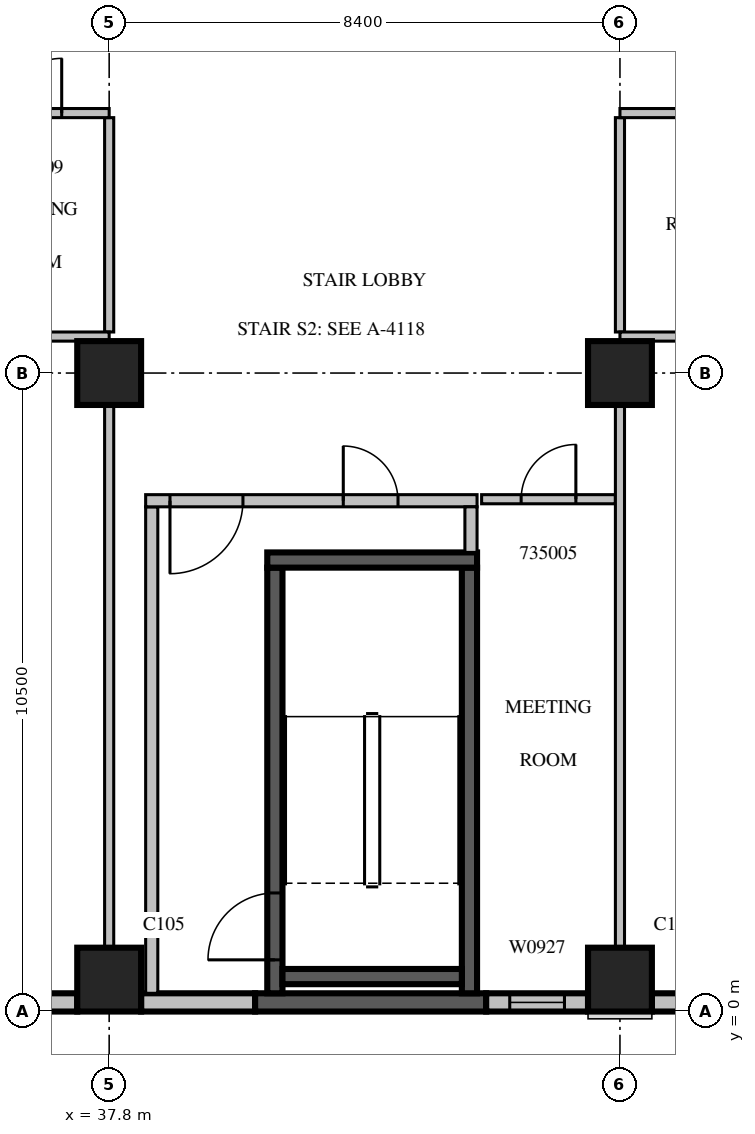
"""IFC4 building model, lengths in metres.
Left out: names, types, materials, properties, quantities, classifications, styles, units other than length and angle.
Written with IfcOpenShell. Run it as: python <this file> out.ifc"""

import sys

from ifc_helpers import new_model, si_unit, direction, frame, frame_2d, origin, origin_2d, place, context, subcontext, project, spatial, rectangle, extrude, source, transform, mapped, element, fill, save


model = new_model("IFC4")
c1 = context("Model", 3, precision=1e-05, world=origin(), true_north=direction((0.0, 1.0)))
c2 = subcontext(c1, "Body", "Model", "MODEL_VIEW")
j1 = project(units=[si_unit("LENGTHUNIT", "METRE"), si_unit("PLANEANGLEUNIT", "RADIAN")], contexts=[c1])
p1 = place(None, origin())
s1 = spatial("IfcSite", under=j1, at=p1, CompositionType="ELEMENT")
p2 = place(p1, origin())
s2 = spatial("IfcBuilding", under=s1, at=p2, CompositionType="ELEMENT")
p3 = place(p2, frame((0.0, 0.0, 158.1)))
s3 = spatial("IfcBuildingStorey", under=s2, at=p3, CompositionType="ELEMENT", Elevation=158.1)
m1 = source(origin(), c2, "Body", "SweptSolid", [
    extrude(rectangle(XDim=1.05, YDim=1.05, at=origin_2d()), origin(), (0.0, 0.0, 1.0), 4.2),
])
for number, where, z_axis, x_axis in (
    (1, (37.8, 0.525, 0.0), (0.0, 0.0, 1.0), (1.0, 0.0, 0.0)),
    (2, (46.2, 0.525, 0.0), (0.0, 0.0, 1.0), (1.0, 0.0, 0.0)),
    (3, (37.8, 10.5, 0.0), (0.0, 0.0, 1.0), (1.0, 0.0, 0.0)),
    (4, (46.2, 10.5, 0.0), (0.0, 0.0, 1.0), (1.0, 0.0, 0.0)),
):
    element("IfcColumn", number, at=place(p3, frame(where, z_axis=z_axis, x_axis=x_axis)), inside=s3, PredefinedType="COLUMN", context=c2, shape_type="MappedRepresentation", body=[
        mapped(m1, transform((0.0, 0.0, 0.0), scale=1.0)),
    ])
m2 = source(origin(), c2, "Body", "SweptSolid", [
    extrude(rectangle(XDim=7.35, YDim=0.3, at=frame_2d((3.675, 0.0))), origin(), (0.0, 0.0, 1.0), 3.8),
])
p4 = place(p3, frame((29.925, 0.15, 0.0), z_axis=(0.0, 0.0, 1.0), x_axis=(1.0, 0.0, 0.0)))
e5 = element("IfcWall", 5, at=p4, inside=s3, PredefinedType="STANDARD", context=c2, shape_type="MappedRepresentation", body=[
    mapped(m2, transform((0.0, 0.0, 0.0), scale=1.0)),
])
m3 = source(origin(), c2, "Body", "SweptSolid", [
    extrude(rectangle(XDim=2.4, YDim=2.7, at=frame_2d((1.2, 1.35))), frame((0.0, 0.16, 0.0), z_axis=(0.0, -1.0, 0.0), x_axis=(1.0, 0.0, 0.0)), (0.0, 0.0, 1.0), 0.32),
])
p5 = place(p4, frame((2.575, 0.0, 0.6)))
e6 = element("IfcOpeningElement", 6, at=p5, cuts=e5, PredefinedType="OPENING", context=c2, shape_type="MappedRepresentation", body=[
    mapped(m3, transform((0.0, 0.0, 0.0), scale=1.0)),
])
m4 = source(origin(), c2, "Body", "SweptSolid", [
    extrude(rectangle(XDim=1.875, YDim=0.3, at=frame_2d((0.938, 0.0))), origin(), (0.0, 0.0, 1.0), 3.8),
])
p6 = place(p3, frame((38.325, 0.15, 0.0), z_axis=(0.0, 0.0, 1.0), x_axis=(1.0, 0.0, 0.0)))
e7 = element("IfcWall", 7, at=p6, inside=s3, PredefinedType="STANDARD", context=c2, shape_type="MappedRepresentation", body=[
    mapped(m4, transform((0.0, 0.0, 0.0), scale=1.0)),
])
m5 = source(origin(), c2, "Body", "SweptSolid", [
    extrude(rectangle(XDim=3.8, YDim=0.3, at=frame_2d((1.9, 0.0))), origin(), (0.0, 0.0, 1.0), 3.8),
])
p7 = place(p3, frame((40.2, 0.15, 0.0), z_axis=(0.0, 0.0, 1.0), x_axis=(1.0, 0.0, 0.0)))
e8 = element("IfcWall", 8, at=p7, inside=s3, PredefinedType="SOLIDWALL", context=c2, shape_type="MappedRepresentation", body=[
    mapped(m5, transform((0.0, 0.0, 0.0), scale=1.0)),
])
m6 = source(origin(), c2, "Body", "SweptSolid", [
    extrude(rectangle(XDim=1.675, YDim=0.3, at=frame_2d((0.838, 0.0))), origin(), (0.0, 0.0, 1.0), 3.8),
])
p8 = place(p3, frame((44.0, 0.15, 0.0), z_axis=(0.0, 0.0, 1.0), x_axis=(1.0, 0.0, 0.0)))
e9 = element("IfcWall", 9, at=p8, inside=s3, PredefinedType="STANDARD", context=c2, shape_type="MappedRepresentation", body=[
    mapped(m6, transform((0.0, 0.0, 0.0), scale=1.0)),
])
m7 = source(origin(), c2, "Body", "SweptSolid", [
    extrude(rectangle(XDim=0.9, YDim=2.7, at=frame_2d((0.45, 1.35))), frame((0.0, 0.16, 0.0), z_axis=(0.0, -1.0, 0.0), x_axis=(1.0, 0.0, 0.0)), (0.0, 0.0, 1.0), 0.32),
])
p9 = place(p8, frame((0.388, 0.0, 0.6)))
e10 = element("IfcOpeningElement", 10, at=p9, cuts=e9, PredefinedType="OPENING", context=c2, shape_type="MappedRepresentation", body=[
    mapped(m7, transform((0.0, 0.0, 0.0), scale=1.0)),
])
m8 = source(origin(), c2, "Body", "SweptSolid", [
    extrude(rectangle(XDim=4.83, YDim=0.3, at=frame_2d((2.415, 0.0))), origin(), (0.0, 0.0, 1.0), 3.8),
])
p10 = place(p3, frame((46.725, 0.15, 0.0), z_axis=(0.0, 0.0, 1.0), x_axis=(1.0, 0.0, 0.0)))
e11 = element("IfcWall", 11, at=p10, inside=s3, PredefinedType="STANDARD", context=c2, shape_type="MappedRepresentation", body=[
    mapped(m8, transform((0.0, 0.0, 0.0), scale=1.0)),
])
m9 = source(origin(), c2, "Body", "SweptSolid", [
    extrude(rectangle(XDim=3.6, YDim=2.7, at=frame_2d((1.8, 1.35))), frame((0.0, 0.16, 0.0), z_axis=(0.0, -1.0, 0.0), x_axis=(1.0, 0.0, 0.0)), (0.0, 0.0, 1.0), 0.32),
])
p11 = place(p10, frame((0.615, 0.0, 0.6)))
e12 = element("IfcOpeningElement", 12, at=p11, cuts=e11, PredefinedType="OPENING", context=c2, shape_type="MappedRepresentation", body=[
    mapped(m9, transform((0.0, 0.0, 0.0), scale=1.0)),
])
m10 = source(origin(), c2, "Body", "SweptSolid", [
    extrude(rectangle(XDim=7.0, YDim=0.25, at=frame_2d((3.5, 0.0))), origin(), (0.0, 0.0, 1.0), 3.8),
])
p12 = place(p3, frame((40.525, 0.3, 0.0), z_axis=(0.0, 0.0, 1.0), x_axis=(0.0, 1.0, 0.0)))
e13 = element("IfcWall", 13, at=p12, inside=s3, PredefinedType="SOLIDWALL", context=c2, shape_type="MappedRepresentation", body=[
    mapped(m10, transform((0.0, 0.0, 0.0), scale=1.0)),
])
m11 = source(origin(), c2, "Body", "SweptSolid", [
    extrude(rectangle(XDim=1.1, YDim=2.1, at=frame_2d((0.55, 1.05))), frame((0.0, 0.135, 0.0), z_axis=(0.0, -1.0, 0.0), x_axis=(1.0, 0.0, 0.0)), (0.0, 0.0, 1.0), 0.27),
])
p13 = place(p12, frame((0.55, 0.0, 0.0)))
e14 = element("IfcOpeningElement", 14, at=p13, cuts=e13, PredefinedType="OPENING", context=c2, shape_type="MappedRepresentation", body=[
    mapped(m11, transform((0.0, 0.0, 0.0), scale=1.0)),
])
p14 = place(p3, frame((43.725, 0.3, 0.0), z_axis=(0.0, 0.0, 1.0), x_axis=(0.0, 1.0, 0.0)))
e15 = element("IfcWall", 15, at=p14, inside=s3, PredefinedType="SOLIDWALL", context=c2, shape_type="MappedRepresentation", body=[
    mapped(m10, transform((0.0, 0.0, 0.0), scale=1.0)),
])
m12 = source(origin(), c2, "Body", "SweptSolid", [
    extrude(rectangle(XDim=3.45, YDim=0.25, at=frame_2d((1.725, 0.0))), origin(), (0.0, 0.0, 1.0), 3.8),
])
p15 = place(p3, frame((40.4, 7.425, 0.0), z_axis=(0.0, 0.0, 1.0), x_axis=(1.0, 0.0, 0.0)))
e16 = element("IfcWall", 16, at=p15, inside=s3, PredefinedType="SOLIDWALL", context=c2, shape_type="MappedRepresentation", body=[
    mapped(m12, transform((0.0, 0.0, 0.0), scale=1.0)),
])
m13 = source(origin(), c2, "Body", "SweptSolid", [
    extrude(rectangle(XDim=2.95, YDim=0.25, at=frame_2d((1.475, 0.0))), origin(), (0.0, 0.0, 1.0), 3.8),
])
p16 = place(p3, frame((40.65, 0.575, 0.0), z_axis=(0.0, 0.0, 1.0), x_axis=(1.0, 0.0, 0.0)))
e17 = element("IfcWall", 17, at=p16, inside=s3, PredefinedType="SOLIDWALL", context=c2, shape_type="MappedRepresentation", body=[
    mapped(m13, transform((0.0, 0.0, 0.0), scale=1.0)),
])
m14 = source(origin(), c2, "Body", "SweptSolid", [
    extrude(rectangle(XDim=8.0, YDim=0.2, at=frame_2d((4.0, 0.0))), origin(), (0.0, 0.0, 1.0), 3.8),
])
p17 = place(p3, frame((38.5, 0.3, 0.0), z_axis=(0.0, 0.0, 1.0), x_axis=(0.0, 1.0, 0.0)))
e18 = element("IfcWall", 18, at=p17, inside=s3, PredefinedType="PARTITIONING", context=c2, shape_type="MappedRepresentation", body=[
    mapped(m14, transform((0.0, 0.0, 0.0), scale=1.0)),
])
m15 = source(origin(), c2, "Body", "SweptSolid", [
    extrude(rectangle(XDim=5.45, YDim=0.2, at=frame_2d((2.725, 0.0))), origin(), (0.0, 0.0, 1.0), 3.8),
])
p18 = place(p3, frame((38.4, 8.4, 0.0), z_axis=(0.0, 0.0, 1.0), x_axis=(1.0, 0.0, 0.0)))
e19 = element("IfcWall", 19, at=p18, inside=s3, PredefinedType="PARTITIONING", context=c2, shape_type="MappedRepresentation", body=[
    mapped(m15, transform((0.0, 0.0, 0.0), scale=1.0)),
])
m16 = source(origin(), c2, "Body", "SweptSolid", [
    extrude(rectangle(XDim=1.2, YDim=2.1, at=frame_2d((0.6, 1.05))), frame((0.0, 0.11, 0.0), z_axis=(0.0, -1.0, 0.0), x_axis=(1.0, 0.0, 0.0)), (0.0, 0.0, 1.0), 0.22),
])
p19 = place(p18, frame((0.4, 0.0, 0.0)))
e20 = element("IfcOpeningElement", 20, at=p19, cuts=e19, PredefinedType="OPENING", context=c2, shape_type="MappedRepresentation", body=[
    mapped(m16, transform((0.0, 0.0, 0.0), scale=1.0)),
])
m17 = source(origin(), c2, "Body", "SweptSolid", [
    extrude(rectangle(XDim=0.9, YDim=2.1, at=frame_2d((0.45, 1.05))), frame((0.0, 0.11, 0.0), z_axis=(0.0, -1.0, 0.0), x_axis=(1.0, 0.0, 0.0)), (0.0, 0.0, 1.0), 0.22),
])
p20 = place(p18, frame((3.25, 0.0, 0.0)))
e21 = element("IfcOpeningElement", 21, at=p20, cuts=e19, PredefinedType="OPENING", context=c2, shape_type="MappedRepresentation", body=[
    mapped(m17, transform((0.0, 0.0, 0.0), scale=1.0)),
])
m18 = source(origin(), c2, "Body", "SweptSolid", [
    extrude(rectangle(XDim=0.75, YDim=0.2, at=frame_2d((0.375, 0.0))), origin(), (0.0, 0.0, 1.0), 3.8),
])
p21 = place(p3, frame((43.75, 7.55, 0.0), z_axis=(0.0, 0.0, 1.0), x_axis=(0.0, 1.0, 0.0)))
e22 = element("IfcWall", 22, at=p21, inside=s3, PredefinedType="PARTITIONING", context=c2, shape_type="MappedRepresentation", body=[
    mapped(m18, transform((0.0, 0.0, 0.0), scale=1.0)),
])
m19 = source(origin(), c2, "Body", "SweptSolid", [
    extrude(rectangle(XDim=2.2, YDim=0.15, at=frame_2d((1.1, 0.0))), origin(), (0.0, 0.0, 1.0), 3.8),
])
p22 = place(p3, frame((46.125, 8.425, 0.0), z_axis=(0.0, 0.0, 1.0), x_axis=(-1.0, 0.0, 0.0)))
e23 = element("IfcWall", 23, at=p22, inside=s3, PredefinedType="PARTITIONING", context=c2, shape_type="MappedRepresentation", body=[
    mapped(m19, transform((0.0, 0.0, 0.0), scale=1.0)),
])
m20 = source(origin(), c2, "Body", "SweptSolid", [
    extrude(rectangle(XDim=0.9, YDim=2.1, at=frame_2d((0.45, 1.05))), frame((0.0, 0.085, 0.0), z_axis=(0.0, -1.0, 0.0), x_axis=(1.0, 0.0, 0.0)), (0.0, 0.0, 1.0), 0.17),
])
p23 = place(p22, frame((0.65, 0.0, 0.0)))
e24 = element("IfcOpeningElement", 24, at=p23, cuts=e23, PredefinedType="OPENING", context=c2, shape_type="MappedRepresentation", body=[
    mapped(m20, transform((0.0, 0.0, 0.0), scale=1.0)),
])
m21 = source(origin(), c2, "Body", "SweptSolid", [
    extrude(rectangle(XDim=8.927, YDim=0.15, at=frame_2d((4.463, 0.0))), origin(), (0.0, 0.0, 1.0), 3.8),
])
p24 = place(p3, frame((37.8, 1.049, 0.0), z_axis=(0.0, 0.0, 1.0), x_axis=(0.0, 1.0, 0.0)))
e25 = element("IfcWall", 25, at=p24, inside=s3, PredefinedType="PARTITIONING", context=c2, shape_type="MappedRepresentation", body=[
    mapped(m21, transform((0.0, 0.0, 0.0), scale=1.0)),
])
m22 = source(origin(), c2, "Body", "SweptSolid", [
    extrude(rectangle(XDim=3.525, YDim=0.15, at=frame_2d((1.762, 0.0))), origin(), (0.0, 0.0, 1.0), 3.8),
])
p25 = place(p3, frame((37.8, 11.175, 0.0), z_axis=(0.0, 0.0, 1.0), x_axis=(0.0, 1.0, 0.0)))
e26 = element("IfcWall", 26, at=p25, inside=s3, PredefinedType="PARTITIONING", context=c2, shape_type="MappedRepresentation", body=[
    mapped(m22, transform((0.0, 0.0, 0.0), scale=1.0)),
])
m23 = source(origin(), c2, "Body", "SweptSolid", [
    extrude(rectangle(XDim=8.4, YDim=0.15, at=frame_2d((4.2, 0.0))), origin(), (0.0, 0.0, 1.0), 3.8),
])
p26 = place(p3, frame((37.8, 11.1, 0.0), z_axis=(0.0, 0.0, 1.0), x_axis=(-1.0, 0.0, 0.0)))
e27 = element("IfcWall", 27, at=p26, inside=s3, PredefinedType="PARTITIONING", context=c2, shape_type="MappedRepresentation", body=[
    mapped(m23, transform((0.0, 0.0, 0.0), scale=1.0)),
])
m24 = source(origin(), c2, "Body", "SweptSolid", [
    extrude(rectangle(XDim=1.1, YDim=2.1, at=frame_2d((0.55, 1.05))), frame((0.0, 0.085, 0.0), z_axis=(0.0, -1.0, 0.0), x_axis=(1.0, 0.0, 0.0)), (0.0, 0.0, 1.0), 0.17),
])
p27 = place(p26, frame((5.871, 0.0, 0.0)))
e28 = element("IfcOpeningElement", 28, at=p27, cuts=e27, PredefinedType="OPENING", context=c2, shape_type="MappedRepresentation", body=[
    mapped(m24, transform((0.0, 0.0, 0.0), scale=1.0)),
])
p28 = place(p3, frame((46.2, 1.049, 0.0), z_axis=(0.0, 0.0, 1.0), x_axis=(0.0, 1.0, 0.0)))
e29 = element("IfcWall", 29, at=p28, inside=s3, PredefinedType="PARTITIONING", context=c2, shape_type="MappedRepresentation", body=[
    mapped(m21, transform((0.0, 0.0, 0.0), scale=1.0)),
])
p29 = place(p3, frame((46.2, 11.175, 0.0), z_axis=(0.0, 0.0, 1.0), x_axis=(0.0, 1.0, 0.0)))
e30 = element("IfcWall", 30, at=p29, inside=s3, PredefinedType="PARTITIONING", context=c2, shape_type="MappedRepresentation", body=[
    mapped(m22, transform((0.0, 0.0, 0.0), scale=1.0)),
])
m25 = source(origin(), c2, "Body", "SweptSolid", [
    extrude(rectangle(XDim=24.9, YDim=0.15, at=frame_2d((12.45, 0.0))), origin(), (0.0, 0.0, 1.0), 3.8),
])
p30 = place(p3, frame((71.1, 11.1, 0.0), z_axis=(0.0, 0.0, 1.0), x_axis=(-1.0, 0.0, 0.0)))
e31 = element("IfcWall", 31, at=p30, inside=s3, PredefinedType="PARTITIONING", context=c2, shape_type="MappedRepresentation", body=[
    mapped(m25, transform((0.0, 0.0, 0.0), scale=1.0)),
])
p31 = place(p30, frame((22.451, 0.0, 0.0)))
e32 = element("IfcOpeningElement", 32, at=p31, cuts=e31, PredefinedType="OPENING", context=c2, shape_type="MappedRepresentation", body=[
    mapped(m24, transform((0.0, 0.0, 0.0), scale=1.0)),
])
p32 = place(p30, frame((2.041, 0.0, 0.0)))
e33 = element("IfcOpeningElement", 33, at=p32, cuts=e31, PredefinedType="OPENING", context=c2, shape_type="MappedRepresentation", body=[
    mapped(m24, transform((0.0, 0.0, 0.0), scale=1.0)),
])
p33 = place(p3, frame((37.8, 14.775, 0.0), z_axis=(0.0, 0.0, 1.0), x_axis=(-1.0, 0.0, 0.0)))
e34 = element("IfcWall", 34, at=p33, inside=s3, PredefinedType="PARTITIONING", context=c2, shape_type="MappedRepresentation", body=[
    mapped(m23, transform((0.0, 0.0, 0.0), scale=1.0)),
])
p34 = place(p33, frame((6.146, 0.0, 0.0)))
e35 = element("IfcOpeningElement", 35, at=p34, cuts=e34, PredefinedType="OPENING", context=c2, shape_type="MappedRepresentation", body=[
    mapped(m24, transform((0.0, 0.0, 0.0), scale=1.0)),
])
p35 = place(p33, frame((3.276, 0.0, 0.0)))
e36 = element("IfcOpeningElement", 36, at=p35, cuts=e34, PredefinedType="OPENING", context=c2, shape_type="MappedRepresentation", body=[
    mapped(m20, transform((0.0, 0.0, 0.0), scale=1.0)),
])
p36 = place(p33, frame((0.781, 0.0, 0.0)))
e37 = element("IfcOpeningElement", 37, at=p36, cuts=e34, PredefinedType="OPENING", context=c2, shape_type="MappedRepresentation", body=[
    mapped(m20, transform((0.0, 0.0, 0.0), scale=1.0)),
])
p37 = place(p3, frame((71.1, 14.775, 0.0), z_axis=(0.0, 0.0, 1.0), x_axis=(-1.0, 0.0, 0.0)))
e38 = element("IfcWall", 38, at=p37, inside=s3, PredefinedType="PARTITIONING", context=c2, shape_type="MappedRepresentation", body=[
    mapped(m25, transform((0.0, 0.0, 0.0), scale=1.0)),
])
p38 = place(p37, frame((22.726, 0.0, 0.0)))
e39 = element("IfcOpeningElement", 39, at=p38, cuts=e38, PredefinedType="OPENING", context=c2, shape_type="MappedRepresentation", body=[
    mapped(m24, transform((0.0, 0.0, 0.0), scale=1.0)),
])
p39 = place(p37, frame((19.886, 0.0, 0.0)))
e40 = element("IfcOpeningElement", 40, at=p39, cuts=e38, PredefinedType="OPENING", context=c2, shape_type="MappedRepresentation", body=[
    mapped(m20, transform((0.0, 0.0, 0.0), scale=1.0)),
])
p40 = place(p37, frame((16.905, 0.0, 0.0)))
e41 = element("IfcOpeningElement", 41, at=p40, cuts=e38, PredefinedType="OPENING", context=c2, shape_type="MappedRepresentation", body=[
    mapped(m20, transform((0.0, 0.0, 0.0), scale=1.0)),
])
p41 = place(p37, frame((13.965, 0.0, 0.0)))
e42 = element("IfcOpeningElement", 42, at=p41, cuts=e38, PredefinedType="OPENING", context=c2, shape_type="MappedRepresentation", body=[
    mapped(m20, transform((0.0, 0.0, 0.0), scale=1.0)),
])
p42 = place(p37, frame((1.088, 0.0, 0.0)))
e43 = element("IfcOpeningElement", 43, at=p42, cuts=e38, PredefinedType="OPENING", context=c2, shape_type="MappedRepresentation", body=[
    mapped(m24, transform((0.0, 0.0, 0.0), scale=1.0)),
])
p43 = place(p37, frame((9.75, 0.0, 0.0)))
e44 = element("IfcOpeningElement", 44, at=p43, cuts=e38, PredefinedType="OPENING", context=c2, shape_type="MappedRepresentation", body=[
    mapped(m20, transform((0.0, 0.0, 0.0), scale=1.0)),
])
p44 = place(p37, frame((4.856, 0.0, 0.0)))
e45 = element("IfcOpeningElement", 45, at=p44, cuts=e38, PredefinedType="OPENING", context=c2, shape_type="MappedRepresentation", body=[
    mapped(m20, transform((0.0, 0.0, 0.0), scale=1.0)),
])
m26 = source(origin(), c2, "Body", "SweptSolid", [
    extrude(rectangle(XDim=0.9, YDim=2.7, at=frame_2d((0.45, 1.35))), frame((0.0, 0.03, 0.0), z_axis=(0.0, -1.0, 0.0), x_axis=(1.0, 0.0, 0.0)), (0.0, 0.0, 1.0), 0.06),
])
p45 = place(p9, origin())
e46 = element("IfcWindow", 46, at=p45, inside=s3, PartitioningType="SINGLE_PANEL", PredefinedType="WINDOW", context=c2, shape_type="MappedRepresentation", body=[
    mapped(m26, transform((0.0, 0.0, 0.0), scale=1.0)),
])
fill(e10, e46)
m27 = source(origin(), c2, "Body", "SweptSolid", [
    extrude(rectangle(XDim=1.1, YDim=2.1, at=frame_2d((0.55, 1.05))), frame((0.0, 0.025, 0.0), z_axis=(0.0, -1.0, 0.0), x_axis=(1.0, 0.0, 0.0)), (0.0, 0.0, 1.0), 0.05),
])
p46 = place(p13, origin())
e47 = element("IfcDoor", 47, at=p46, inside=s3, OperationType="SINGLE_SWING_LEFT", PredefinedType="DOOR", context=c2, shape_type="MappedRepresentation", body=[
    mapped(m27, transform((0.0, 0.0, 0.0), scale=1.0)),
])
fill(e14, e47)
m28 = source(origin(), c2, "Body", "SweptSolid", [
    extrude(rectangle(XDim=1.2, YDim=2.1, at=frame_2d((0.6, 1.05))), frame((0.0, 0.025, 0.0), z_axis=(0.0, -1.0, 0.0), x_axis=(1.0, 0.0, 0.0)), (0.0, 0.0, 1.0), 0.05),
])
p47 = place(p19, origin())
e48 = element("IfcDoor", 48, at=p47, inside=s3, OperationType="SINGLE_SWING_RIGHT", PredefinedType="DOOR", context=c2, shape_type="MappedRepresentation", body=[
    mapped(m28, transform((0.0, 0.0, 0.0), scale=1.0)),
])
fill(e20, e48)
m29 = source(origin(), c2, "Body", "SweptSolid", [
    extrude(rectangle(XDim=0.9, YDim=2.1, at=frame_2d((0.45, 1.05))), frame((0.0, 0.025, 0.0), z_axis=(0.0, -1.0, 0.0), x_axis=(1.0, 0.0, 0.0)), (0.0, 0.0, 1.0), 0.05),
])
p48 = place(p20, origin())
e49 = element("IfcDoor", 49, at=p48, inside=s3, OperationType="SINGLE_SWING_LEFT", PredefinedType="DOOR", context=c2, shape_type="MappedRepresentation", body=[
    mapped(m29, transform((0.0, 0.0, 0.0), scale=1.0)),
])
fill(e21, e49)
p49 = place(p23, origin())
e50 = element("IfcDoor", 50, at=p49, inside=s3, OperationType="SINGLE_SWING_RIGHT", PredefinedType="DOOR", context=c2, shape_type="MappedRepresentation", body=[
    mapped(m29, transform((0.0, 0.0, 0.0), scale=1.0)),
])
fill(e24, e50)
p50 = place(p36, origin())
e51 = element("IfcDoor", 51, at=p50, inside=s3, OperationType="SINGLE_SWING_RIGHT", PredefinedType="DOOR", context=c2, shape_type="MappedRepresentation", body=[
    mapped(m29, transform((0.0, 0.0, 0.0), scale=1.0)),
])
fill(e37, e51)
save(model, sys.argv[1])
